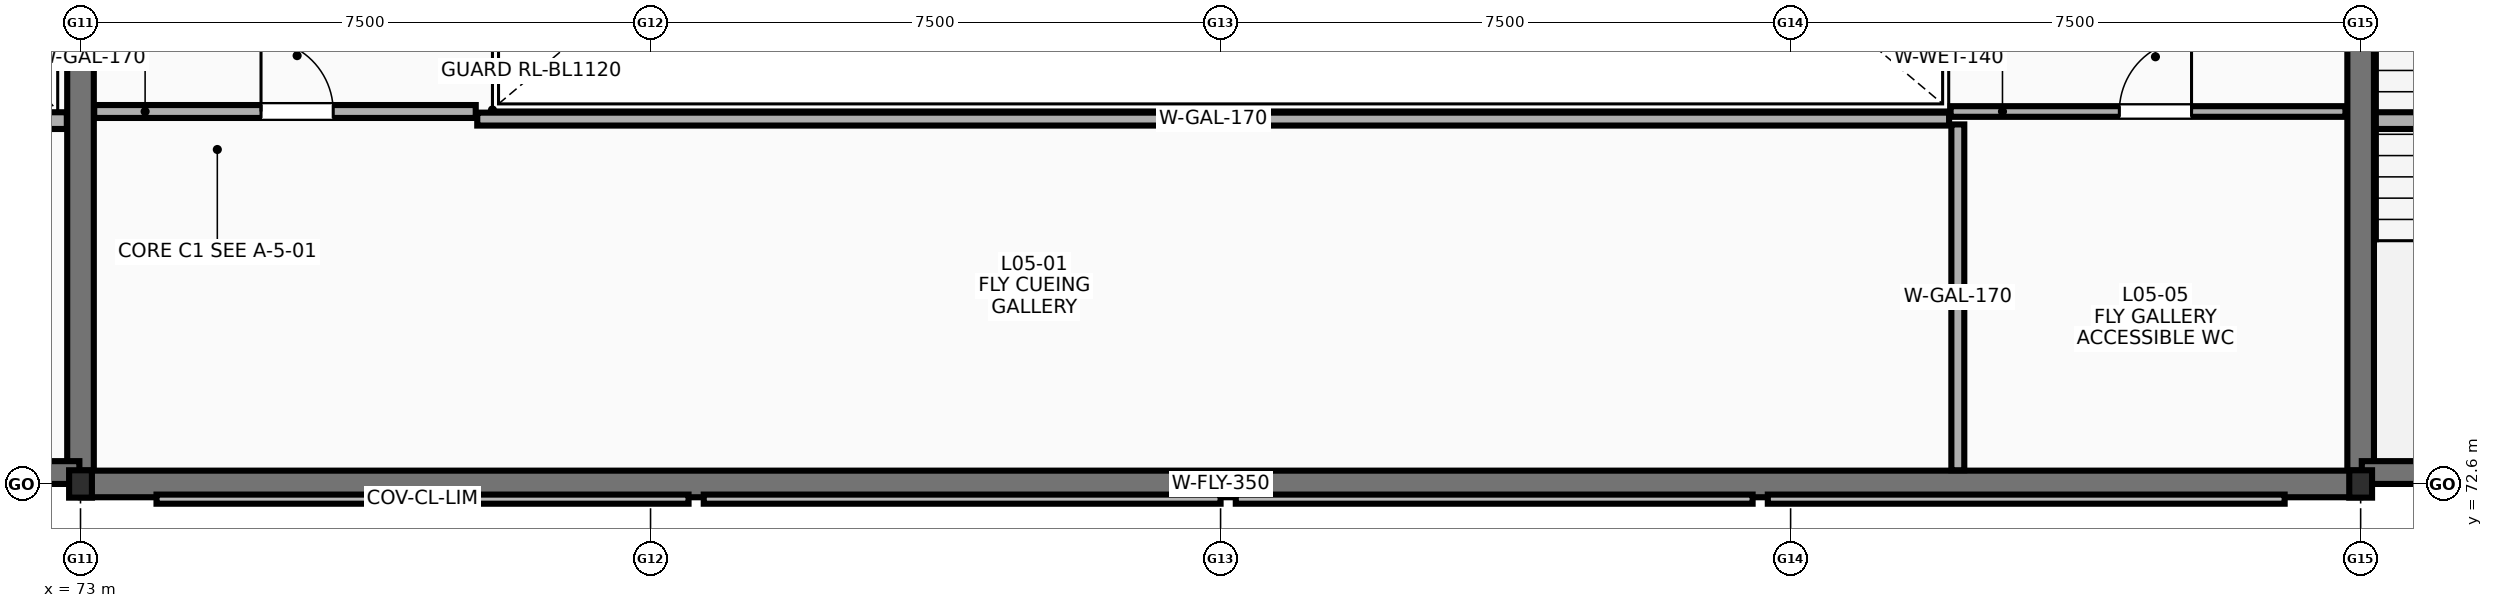
"""IFC4 building model, lengths in metres.
Left out: names, types, materials, properties, quantities, classifications, styles, units other than length and angle.
Written with IfcOpenShell. Run it as: python <this file> out.ifc"""

import sys

from ifc_helpers import new_model, si_unit, direction, frame, frame_2d, origin, origin_2d, place, context, subcontext, project, spatial, rectangle, i_section, extrude, element, fill, save


model = new_model("IFC4")
c1 = context("Model", 3, precision=1e-05, world=origin(), true_north=direction((0.0, 1.0)))
c2 = subcontext(c1, "Body", "Model", "MODEL_VIEW")
j1 = project(units=[si_unit("LENGTHUNIT", "METRE"), si_unit("PLANEANGLEUNIT", "RADIAN")], contexts=[c1])
p1 = place(None, origin())
s1 = spatial("IfcSite", under=j1, at=p1, CompositionType="ELEMENT")
p2 = place(p1, origin())
s2 = spatial("IfcBuilding", under=s1, at=p2, CompositionType="ELEMENT")
p3 = place(p2, frame((0.0, 0.0, 23.4)))
s3 = spatial("IfcBuildingStorey", under=s2, at=p3, CompositionType="ELEMENT", Elevation=23.4)
for number, where, z_axis, x_axis in (
    (1, (73.0, 72.6, 0.0), (0.0, 0.0, 1.0), (1.0, 0.0, 0.0)),
    (2, (103.0, 72.6, 0.0), (0.0, 0.0, 1.0), (1.0, 0.0, 0.0)),
):
    element("IfcColumn", number, at=place(p3, frame(where, z_axis=z_axis, x_axis=x_axis)), inside=s3, PredefinedType="COLUMN", context=c2, shape_type="SweptSolid", body=[
        extrude(i_section(OverallWidth=0.3, OverallDepth=0.36, WebThickness=0.012, FlangeThickness=0.022, FilletRadius=0.027, at=origin_2d()), origin(), (0.0, 0.0, 1.0), 4.8),
    ])
p4 = place(p3, frame((73.0, 72.77, 0.0), z_axis=(0.0, 0.0, 1.0), x_axis=(0.0, 1.0, 0.0)))
e3 = element("IfcWall", 3, at=p4, inside=s3, PredefinedType="SHEAR", context=c2, shape_type="SweptSolid", body=[
    extrude(rectangle(XDim=25.66, YDim=0.35, at=frame_2d((12.83, 0.0))), origin(), (0.0, 0.0, 1.0), 4.8),
])
p5 = place(p4, frame((11.33, 0.0, 0.0), z_axis=(0.0, 0.0, 1.0), x_axis=(-1.0, 0.0, 0.0)))
e4 = element("IfcOpeningElement", 4, at=p5, cuts=e3, PredefinedType="OPENING", context=c2, shape_type="SweptSolid", body=[
    extrude(rectangle(XDim=1.2, YDim=2.15, at=frame_2d((0.6, 1.075))), frame((0.0, 0.185, 0.0), z_axis=(0.0, -1.0, 0.0), x_axis=(1.0, 0.0, 0.0)), (0.0, 0.0, 1.0), 0.37),
])
p6 = place(p3, frame((103.0, 72.77, 0.0), z_axis=(0.0, 0.0, 1.0), x_axis=(0.0, 1.0, 0.0)))
e5 = element("IfcWall", 5, at=p6, inside=s3, PredefinedType="SHEAR", context=c2, shape_type="SweptSolid", body=[
    extrude(rectangle(XDim=25.66, YDim=0.35, at=frame_2d((12.83, 0.0))), origin(), (0.0, 0.0, 1.0), 4.8),
])
p7 = place(p6, frame((10.13, 0.0, 0.0)))
e6 = element("IfcOpeningElement", 6, at=p7, cuts=e5, PredefinedType="OPENING", context=c2, shape_type="SweptSolid", body=[
    extrude(rectangle(XDim=1.2, YDim=2.15, at=frame_2d((0.6, 1.075))), frame((0.0, 0.185, 0.0), z_axis=(0.0, -1.0, 0.0), x_axis=(1.0, 0.0, 0.0)), (0.0, 0.0, 1.0), 0.37),
])
p8 = place(p3, frame((73.005, 72.6, 0.0), z_axis=(0.0, 0.0, 1.0), x_axis=(1.0, 0.0, 0.0)))
e7 = element("IfcWall", 7, at=p8, inside=s3, PredefinedType="SHEAR", context=c2, shape_type="SweptSolid", body=[
    extrude(rectangle(XDim=29.99, YDim=0.35, at=frame_2d((14.995, 0.0))), origin(), (0.0, 0.0, 1.0), 4.8),
])
for number, where, z_axis, x_axis in (
    (8, (69.7, 77.38, 0.0), (0.0, 0.0, 1.0), (1.0, 0.0, 0.0)),
    (9, (103.18, 77.38, 0.0), (0.0, 0.0, 1.0), (1.0, 0.0, 0.0)),
):
    element("IfcWall", number, at=place(p3, frame(where, z_axis=z_axis, x_axis=x_axis)), inside=s3, PredefinedType="SOLIDWALL", context=c2, shape_type="SweptSolid", body=[
        extrude(rectangle(XDim=3.12, YDim=0.22, at=frame_2d((1.56, 0.0))), origin(), (0.0, 0.0, 1.0), 4.8),
    ])
p9 = place(p3, frame((97.7, 72.78, 0.0), z_axis=(0.0, 0.0, 1.0), x_axis=(0.0, 1.0, 0.0)))
e10 = element("IfcWall", 10, at=p9, inside=s3, PredefinedType="PARTITIONING", context=c2, shape_type="SweptSolid", body=[
    extrude(rectangle(XDim=4.55, YDim=0.17, at=frame_2d((2.275, 0.0))), origin(), (0.0, 0.0, 1.0), 4.5),
])
p10 = place(p3, frame((73.18, 77.5, 0.0), z_axis=(0.0, 0.0, 1.0), x_axis=(1.0, 0.0, 0.0)))
e11 = element("IfcWall", 11, at=p10, inside=s3, PredefinedType="PARTITIONING", context=c2, shape_type="SweptSolid", body=[
    extrude(rectangle(XDim=5.02, YDim=0.17, at=frame_2d((2.51, 0.0))), origin(), (0.0, 0.0, 1.0), 4.5),
])
p11 = place(p10, frame((2.195, 0.0, 0.0)))
e12 = element("IfcOpeningElement", 12, at=p11, cuts=e11, PredefinedType="OPENING", context=c2, shape_type="SweptSolid", body=[
    extrude(rectangle(XDim=0.95, YDim=2.15, at=frame_2d((0.475, 1.075))), frame((0.0, 0.095, 0.0), z_axis=(0.0, -1.0, 0.0), x_axis=(1.0, 0.0, 0.0)), (0.0, 0.0, 1.0), 0.19),
])
p12 = place(p3, frame((97.605, 77.5, 0.0), z_axis=(0.0, 0.0, 1.0), x_axis=(1.0, 0.0, 0.0)))
e13 = element("IfcWall", 13, at=p12, inside=s3, PredefinedType="PARTITIONING", context=c2, shape_type="SweptSolid", body=[
    extrude(rectangle(XDim=5.195, YDim=0.14, at=frame_2d((2.598, 0.0))), origin(), (0.0, 0.0, 1.0), 4.5),
])
p13 = place(p12, frame((2.22, 0.0, 0.0)))
e14 = element("IfcOpeningElement", 14, at=p13, cuts=e13, PredefinedType="OPENING", context=c2, shape_type="SweptSolid", body=[
    extrude(rectangle(XDim=0.95, YDim=2.1, at=frame_2d((0.475, 1.05))), frame((0.0, 0.08, 0.0), z_axis=(0.0, -1.0, 0.0), x_axis=(1.0, 0.0, 0.0)), (0.0, 0.0, 1.0), 0.16),
])
for number, where, z_axis, x_axis in (
    (15, (65.5, 72.75, 0.0), (0.0, 0.0, 1.0), (1.0, 0.0, 0.0)),
    (16, (103.015, 72.75, 0.0), (0.0, 0.0, 1.0), (1.0, 0.0, 0.0)),
):
    element("IfcWall", number, at=place(p3, frame(where, z_axis=z_axis, x_axis=x_axis)), inside=s3, PredefinedType="SHEAR", context=c2, shape_type="SweptSolid", body=[
        extrude(rectangle(XDim=7.485, YDim=0.3, at=frame_2d((3.743, 0.0))), origin(), (0.0, 0.0, 1.0), 4.8),
    ])
p14 = place(p3, frame((78.22, 77.4, 0.0), z_axis=(0.0, 0.0, 1.0), x_axis=(1.0, 0.0, 0.0)))
e17 = element("IfcWall", 17, at=p14, inside=s3, PredefinedType="PARTITIONING", context=c2, shape_type="SweptSolid", body=[
    extrude(rectangle(XDim=19.365, YDim=0.17, at=frame_2d((9.683, 0.0))), origin(), (0.0, 0.0, 1.0), 4.5),
])
p15 = place(p11, origin())
e18 = element("IfcDoor", 18, at=p15, inside=s3, OperationType="SINGLE_SWING_LEFT", PredefinedType="DOOR", context=c2, shape_type="SweptSolid", body=[
    extrude(rectangle(XDim=0.95, YDim=2.15, at=frame_2d((0.475, 1.075))), frame((0.0, 0.025, 0.0), z_axis=(0.0, -1.0, 0.0), x_axis=(1.0, 0.0, 0.0)), (0.0, 0.0, 1.0), 0.05),
])
fill(e12, e18)
p16 = place(p13, origin())
e19 = element("IfcDoor", 19, at=p16, inside=s3, OperationType="SINGLE_SWING_RIGHT", PredefinedType="DOOR", context=c2, shape_type="SweptSolid", body=[
    extrude(rectangle(XDim=0.95, YDim=2.1, at=frame_2d((0.475, 1.05))), frame((0.0, 0.025, 0.0), z_axis=(0.0, -1.0, 0.0), x_axis=(1.0, 0.0, 0.0)), (0.0, 0.0, 1.0), 0.05),
])
fill(e14, e19)
save(model, sys.argv[1])
